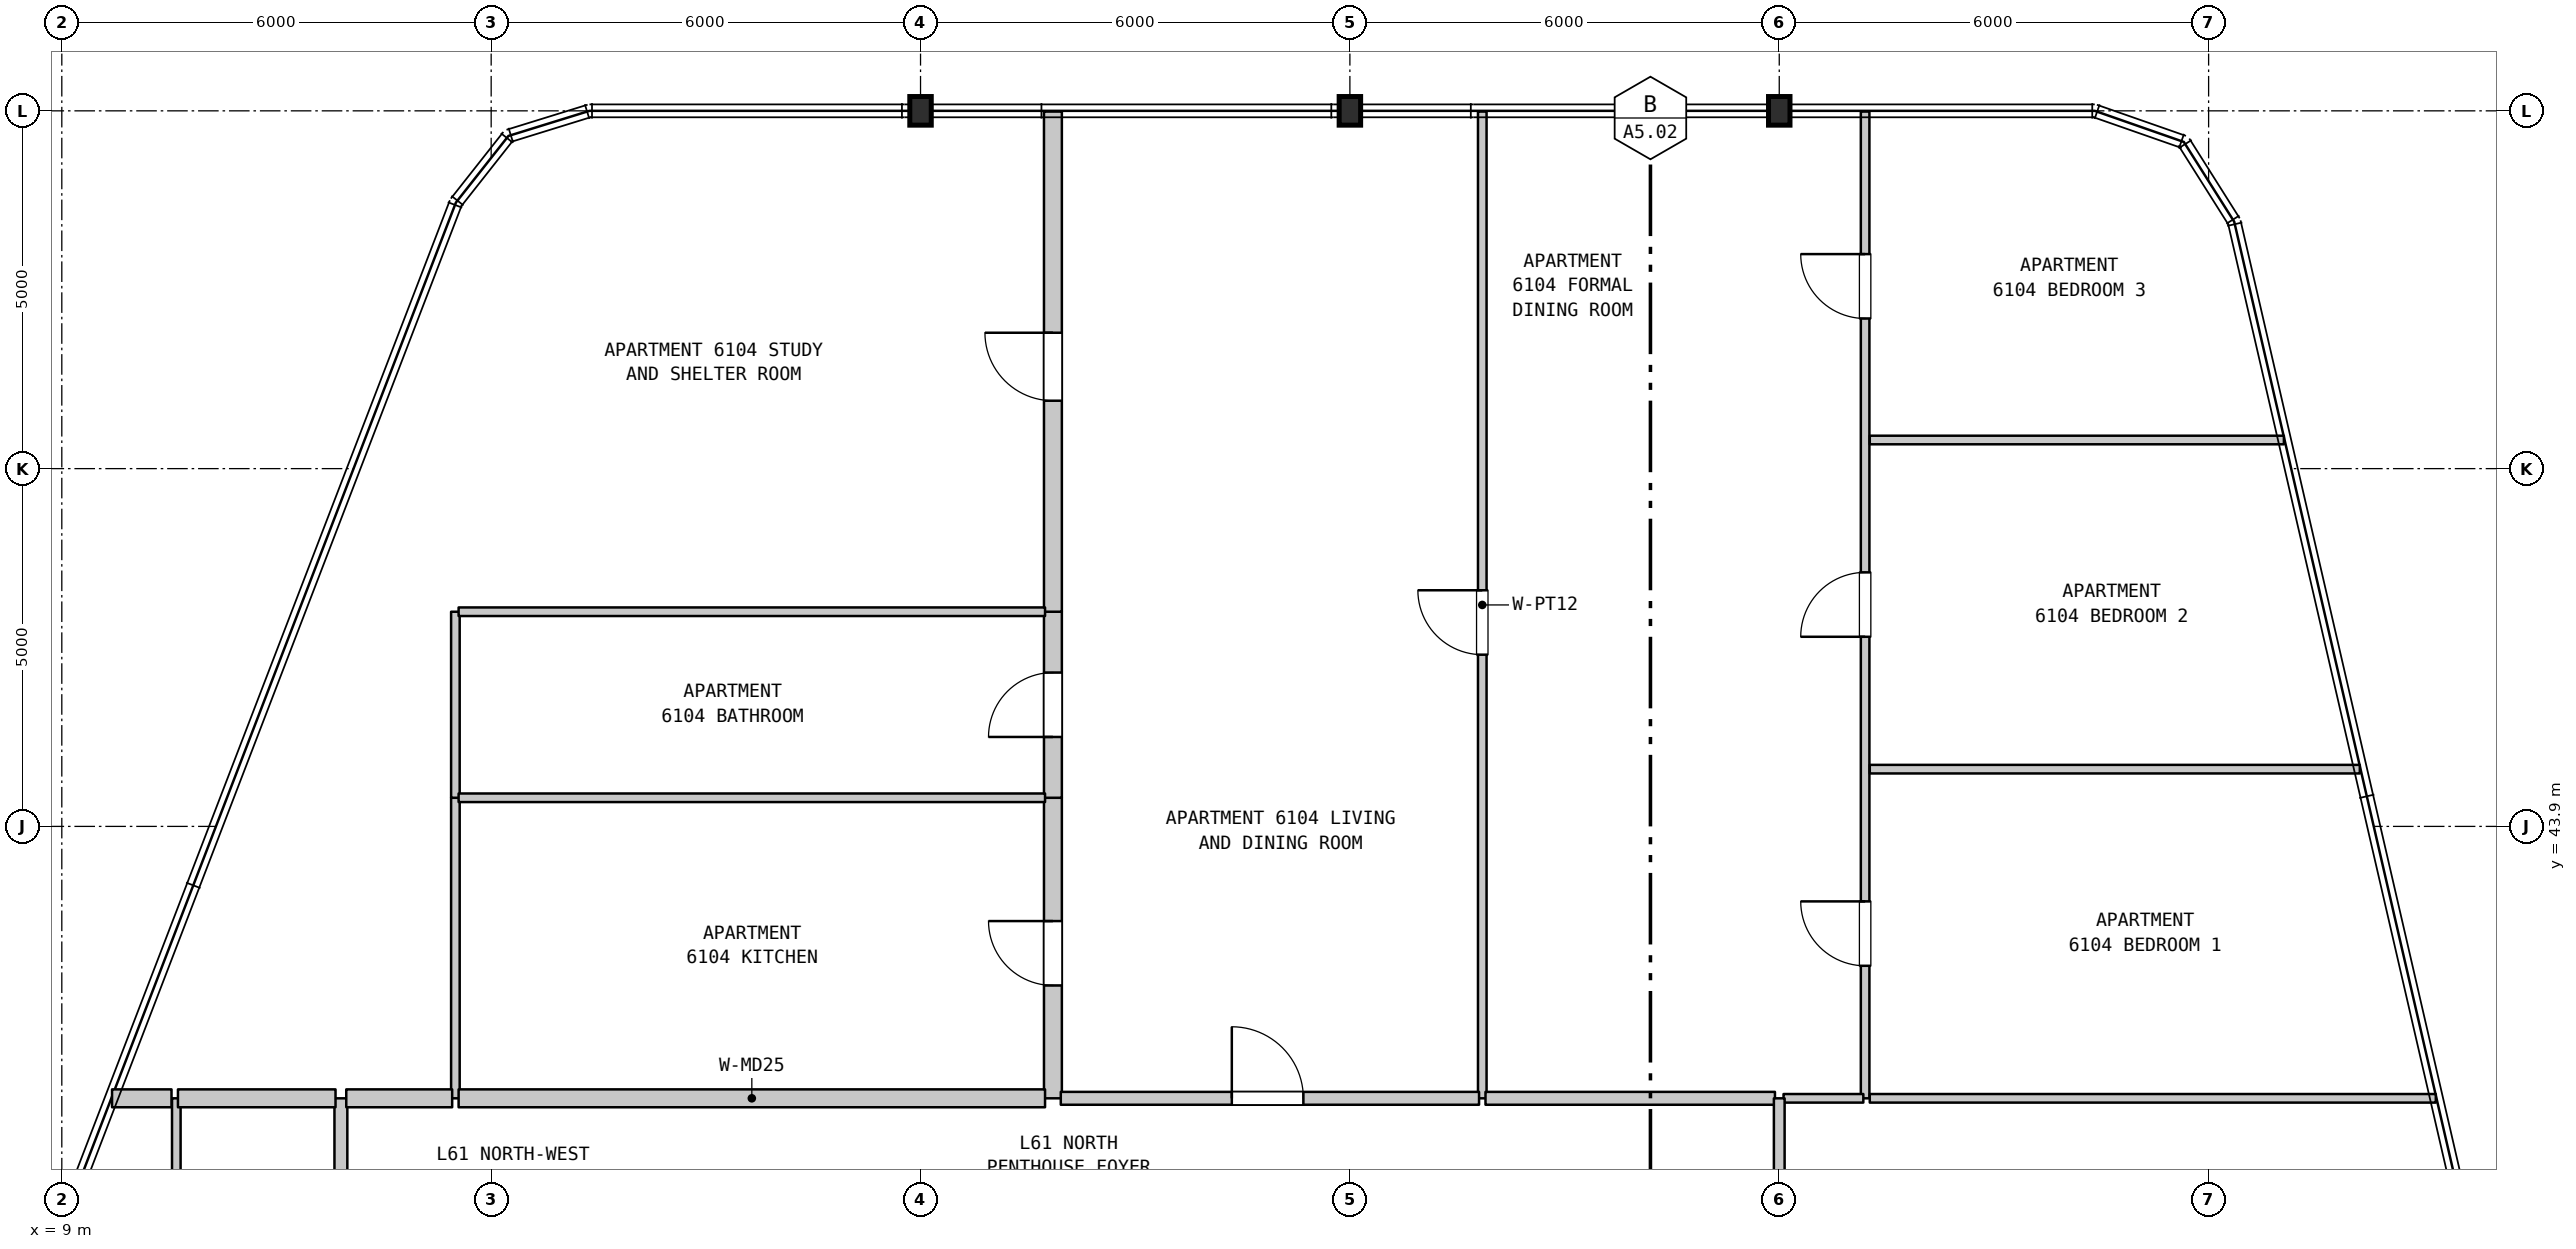
"""IFC4 building model, lengths in metres.
Left out: names, types, materials, properties, quantities, classifications, styles, units other than length and angle.
Written with IfcOpenShell. Run it as: python <this file> out.ifc"""

import sys

from ifc_helpers import new_model, si_unit, direction, frame, frame_2d, origin, origin_2d, place, context, subcontext, project, spatial, rectangle, i_section, extrude, element, fill, save


model = new_model("IFC4")
c1 = context("Model", 3, precision=1e-05, world=origin(), true_north=direction((0.0, 1.0)))
c2 = subcontext(c1, "Body", "Model", "MODEL_VIEW")
j1 = project(units=[si_unit("LENGTHUNIT", "METRE"), si_unit("PLANEANGLEUNIT", "RADIAN")], contexts=[c1])
p1 = place(None, origin())
s1 = spatial("IfcSite", under=j1, at=p1, CompositionType="ELEMENT")
p2 = place(p1, origin())
s2 = spatial("IfcBuilding", under=s1, at=p2, CompositionType="ELEMENT")
p3 = place(p2, frame((0.0, 0.0, 247.3)))
s3 = spatial("IfcBuildingStorey", under=s2, at=p3, CompositionType="ELEMENT", Elevation=247.3)
for number, where, z_axis, x_axis in (
    (1, (21.0, 53.9, 0.0), (0.0, 0.0, 1.0), (1.0, 0.0, 0.0)),
    (2, (27.0, 53.9, 0.0), (0.0, 0.0, 1.0), (1.0, 0.0, 0.0)),
    (3, (33.0, 53.9, 0.0), (0.0, 0.0, 1.0), (1.0, 0.0, 0.0)),
):
    element("IfcColumn", number, at=place(p3, frame(where, z_axis=z_axis, x_axis=x_axis)), inside=s3, PredefinedType="COLUMN", context=c2, shape_type="SweptSolid", body=[
        extrude(i_section(OverallWidth=0.3, OverallDepth=0.4, WebThickness=0.013, FlangeThickness=0.024, FilletRadius=0.027, at=origin_2d()), origin(), (0.0, 0.0, 1.0), 3.7),
    ])
p4 = place(p3, frame((10.6, 31.5, 0.0), z_axis=(0.0, 0.0, 1.0), x_axis=(0.0, 1.0, 0.0)))
e4 = element("IfcWall", 4, at=p4, inside=s3, PredefinedType="PARTITIONING", context=c2, shape_type="SweptSolid", body=[
    extrude(rectangle(XDim=8.6, YDim=0.12, at=frame_2d((4.3, 0.0))), origin(), (0.0, 0.0, 1.0), 3.39),
])
p5 = place(p3, frame((12.9, 31.5, 0.0), z_axis=(0.0, 0.0, 1.0), x_axis=(0.0, 1.0, 0.0)))
e5 = element("IfcWall", 5, at=p5, inside=s3, PredefinedType="STANDARD", context=c2, shape_type="SweptSolid", body=[
    extrude(rectangle(XDim=8.6, YDim=0.18, at=frame_2d((4.3, 0.0))), origin(), (0.0, 0.0, 1.0), 3.39),
])
p6 = place(p3, frame((14.5, 40.1, 0.0), z_axis=(0.0, 0.0, 1.0), x_axis=(0.0, 1.0, 0.0)))
e6 = element("IfcWall", 6, at=p6, inside=s3, PredefinedType="PARTITIONING", context=c2, shape_type="SweptSolid", body=[
    extrude(rectangle(XDim=4.2, YDim=0.12, at=frame_2d((2.1, 0.0))), origin(), (0.0, 0.0, 1.0), 3.39),
])
p7 = place(p3, frame((14.5, 44.3, 0.0), z_axis=(0.0, 0.0, 1.0), x_axis=(0.0, 1.0, 0.0)))
e7 = element("IfcWall", 7, at=p7, inside=s3, PredefinedType="PARTITIONING", context=c2, shape_type="SweptSolid", body=[
    extrude(rectangle(XDim=2.6, YDim=0.12, at=frame_2d((1.3, 0.0))), origin(), (0.0, 0.0, 1.0), 3.39),
])
p8 = place(p3, frame((22.85, 40.1, 0.0), z_axis=(0.0, 0.0, 1.0), x_axis=(0.0, 1.0, 0.0)))
e8 = element("IfcWall", 8, at=p8, inside=s3, PredefinedType="STANDARD", context=c2, shape_type="SweptSolid", body=[
    extrude(rectangle(XDim=4.2, YDim=0.25, at=frame_2d((2.1, 0.0))), origin(), (0.0, 0.0, 1.0), 3.39),
])
p9 = place(p8, frame((1.577, 0.0, 0.0)))
e9 = element("IfcOpeningElement", 9, at=p9, cuts=e8, PredefinedType="OPENING", context=c2, shape_type="SweptSolid", body=[
    extrude(rectangle(XDim=0.9, YDim=2.15, at=frame_2d((0.45, 1.075))), frame((0.0, 0.135, 0.0), z_axis=(0.0, -1.0, 0.0), x_axis=(1.0, 0.0, 0.0)), (0.0, 0.0, 1.0), 0.27),
])
p10 = place(p3, frame((22.85, 44.3, 0.0), z_axis=(0.0, 0.0, 1.0), x_axis=(0.0, 1.0, 0.0)))
e10 = element("IfcWall", 10, at=p10, inside=s3, PredefinedType="STANDARD", context=c2, shape_type="SweptSolid", body=[
    extrude(rectangle(XDim=2.6, YDim=0.25, at=frame_2d((1.3, 0.0))), origin(), (0.0, 0.0, 1.0), 3.39),
])
p11 = place(p10, frame((0.85, 0.0, 0.0)))
e11 = element("IfcOpeningElement", 11, at=p11, cuts=e10, PredefinedType="OPENING", context=c2, shape_type="SweptSolid", body=[
    extrude(rectangle(XDim=0.9, YDim=2.1, at=frame_2d((0.45, 1.05))), frame((0.0, 0.135, 0.0), z_axis=(0.0, -1.0, 0.0), x_axis=(1.0, 0.0, 0.0)), (0.0, 0.0, 1.0), 0.27),
])
p12 = place(p3, frame((22.85, 46.9, 0.0), z_axis=(0.0, 0.0, 1.0), x_axis=(0.0, 1.0, 0.0)))
e12 = element("IfcWall", 12, at=p12, inside=s3, PredefinedType="STANDARD", context=c2, shape_type="SweptSolid", body=[
    extrude(rectangle(XDim=6.99, YDim=0.25, at=frame_2d((3.495, 0.0))), origin(), (0.0, 0.0, 1.0), 3.39),
])
p13 = place(p12, frame((2.949, 0.0, 0.0)))
e13 = element("IfcOpeningElement", 13, at=p13, cuts=e12, PredefinedType="OPENING", context=c2, shape_type="SweptSolid", body=[
    extrude(rectangle(XDim=0.95, YDim=2.15, at=frame_2d((0.475, 1.075))), frame((0.0, 0.135, 0.0), z_axis=(0.0, -1.0, 0.0), x_axis=(1.0, 0.0, 0.0)), (0.0, 0.0, 1.0), 0.27),
])
p14 = place(p3, frame((28.85, 40.1, 0.0), z_axis=(0.0, 0.0, 1.0), x_axis=(0.0, 1.0, 0.0)))
e14 = element("IfcWall", 14, at=p14, inside=s3, PredefinedType="PARTITIONING", context=c2, shape_type="SweptSolid", body=[
    extrude(rectangle(XDim=13.79, YDim=0.12, at=frame_2d((6.895, 0.0))), origin(), (0.0, 0.0, 1.0), 3.39),
])
p15 = place(p14, frame((6.2, 0.0, 0.0)))
e15 = element("IfcOpeningElement", 15, at=p15, cuts=e14, PredefinedType="OPENING", context=c2, shape_type="SweptSolid", body=[
    extrude(rectangle(XDim=0.9, YDim=2.15, at=frame_2d((0.45, 1.075))), frame((0.0, 0.07, 0.0), z_axis=(0.0, -1.0, 0.0), x_axis=(1.0, 0.0, 0.0)), (0.0, 0.0, 1.0), 0.14),
])
p16 = place(p3, frame((34.2, 40.1, 0.0), z_axis=(0.0, 0.0, 1.0), x_axis=(0.0, 1.0, 0.0)))
e16 = element("IfcWall", 16, at=p16, inside=s3, PredefinedType="PARTITIONING", context=c2, shape_type="SweptSolid", body=[
    extrude(rectangle(XDim=13.79, YDim=0.12, at=frame_2d((6.895, 0.0))), origin(), (0.0, 0.0, 1.0), 3.39),
])
p17 = place(p16, frame((1.852, 0.0, 0.0)))
e17 = element("IfcOpeningElement", 17, at=p17, cuts=e16, PredefinedType="OPENING", context=c2, shape_type="SweptSolid", body=[
    extrude(rectangle(XDim=0.9, YDim=2.15, at=frame_2d((0.45, 1.075))), frame((0.0, 0.07, 0.0), z_axis=(0.0, -1.0, 0.0), x_axis=(1.0, 0.0, 0.0)), (0.0, 0.0, 1.0), 0.14),
])
p18 = place(p16, frame((6.45, 0.0, 0.0)))
e18 = element("IfcOpeningElement", 18, at=p18, cuts=e16, PredefinedType="OPENING", context=c2, shape_type="SweptSolid", body=[
    extrude(rectangle(XDim=0.9, YDim=2.15, at=frame_2d((0.45, 1.075))), frame((0.0, 0.07, 0.0), z_axis=(0.0, -1.0, 0.0), x_axis=(1.0, 0.0, 0.0)), (0.0, 0.0, 1.0), 0.14),
])
p19 = place(p16, frame((10.898, 0.0, 0.0)))
e19 = element("IfcOpeningElement", 19, at=p19, cuts=e16, PredefinedType="OPENING", context=c2, shape_type="SweptSolid", body=[
    extrude(rectangle(XDim=0.9, YDim=2.15, at=frame_2d((0.45, 1.075))), frame((0.0, 0.07, 0.0), z_axis=(0.0, -1.0, 0.0), x_axis=(1.0, 0.0, 0.0)), (0.0, 0.0, 1.0), 0.14),
])
p20 = place(p3, frame((9.702, 40.1, 0.0), z_axis=(0.0, 0.0, 1.0), x_axis=(1.0, 0.0, 0.0)))
e20 = element("IfcWall", 20, at=p20, inside=s3, PredefinedType="STANDARD", context=c2, shape_type="SweptSolid", body=[
    extrude(rectangle(XDim=0.831, YDim=0.25, at=frame_2d((0.416, 0.0))), origin(), (0.0, 0.0, 1.0), 3.39),
])
p21 = place(p3, frame((10.623, 40.1, 0.0), z_axis=(0.0, 0.0, 1.0), x_axis=(1.0, 0.0, 0.0)))
e21 = element("IfcWall", 21, at=p21, inside=s3, PredefinedType="STANDARD", context=c2, shape_type="SweptSolid", body=[
    extrude(rectangle(XDim=2.202, YDim=0.25, at=frame_2d((1.101, 0.0))), origin(), (0.0, 0.0, 1.0), 3.39),
])
p22 = place(p3, frame((12.975, 40.1, 0.0), z_axis=(0.0, 0.0, 1.0), x_axis=(1.0, 0.0, 0.0)))
e22 = element("IfcWall", 22, at=p22, inside=s3, PredefinedType="STANDARD", context=c2, shape_type="SweptSolid", body=[
    extrude(rectangle(XDim=1.48, YDim=0.25, at=frame_2d((0.74, 0.0))), origin(), (0.0, 0.0, 1.0), 3.39),
])
p23 = place(p3, frame((14.545, 40.1, 0.0), z_axis=(0.0, 0.0, 1.0), x_axis=(1.0, 0.0, 0.0)))
e23 = element("IfcWall", 23, at=p23, inside=s3, PredefinedType="STANDARD", context=c2, shape_type="SweptSolid", body=[
    extrude(rectangle(XDim=8.195, YDim=0.25, at=frame_2d((4.098, 0.0))), origin(), (0.0, 0.0, 1.0), 3.39),
])
p24 = place(p3, frame((22.96, 40.1, 0.0), z_axis=(0.0, 0.0, 1.0), x_axis=(1.0, 0.0, 0.0)))
e24 = element("IfcWall", 24, at=p24, inside=s3, PredefinedType="STANDARD", context=c2, shape_type="SweptSolid", body=[
    extrude(rectangle(XDim=5.845, YDim=0.18, at=frame_2d((2.922, 0.0))), origin(), (0.0, 0.0, 1.0), 3.39),
])
p25 = place(p24, frame((2.39, 0.0, 0.0)))
e25 = element("IfcOpeningElement", 25, at=p25, cuts=e24, PredefinedType="OPENING", context=c2, shape_type="SweptSolid", body=[
    extrude(rectangle(XDim=1.0, YDim=2.15, at=frame_2d((0.5, 1.075))), frame((0.0, 0.1, 0.0), z_axis=(0.0, -1.0, 0.0), x_axis=(1.0, 0.0, 0.0)), (0.0, 0.0, 1.0), 0.2),
])
p26 = place(p3, frame((28.895, 40.1, 0.0), z_axis=(0.0, 0.0, 1.0), x_axis=(1.0, 0.0, 0.0)))
e26 = element("IfcWall", 26, at=p26, inside=s3, PredefinedType="STANDARD", context=c2, shape_type="SweptSolid", body=[
    extrude(rectangle(XDim=4.045, YDim=0.18, at=frame_2d((2.022, 0.0))), origin(), (0.0, 0.0, 1.0), 3.39),
])
p27 = place(p3, frame((33.06, 40.1, 0.0), z_axis=(0.0, 0.0, 1.0), x_axis=(1.0, 0.0, 0.0)))
e27 = element("IfcWall", 27, at=p27, inside=s3, PredefinedType="PARTITIONING", context=c2, shape_type="SweptSolid", body=[
    extrude(rectangle(XDim=1.115, YDim=0.12, at=frame_2d((0.558, 0.0))), origin(), (0.0, 0.0, 1.0), 3.39),
])
p28 = place(p3, frame((34.265, 40.1, 0.0), z_axis=(0.0, 0.0, 1.0), x_axis=(1.0, 0.0, 0.0)))
e28 = element("IfcWall", 28, at=p28, inside=s3, PredefinedType="PARTITIONING", context=c2, shape_type="SweptSolid", body=[
    extrude(rectangle(XDim=7.91, YDim=0.12, at=frame_2d((3.955, 0.0))), origin(), (0.0, 0.0, 1.0), 3.39),
])
p29 = place(p3, frame((14.545, 44.3, 0.0), z_axis=(0.0, 0.0, 1.0), x_axis=(1.0, 0.0, 0.0)))
e29 = element("IfcWall", 29, at=p29, inside=s3, PredefinedType="PARTITIONING", context=c2, shape_type="SweptSolid", body=[
    extrude(rectangle(XDim=8.195, YDim=0.12, at=frame_2d((4.098, 0.0))), origin(), (0.0, 0.0, 1.0), 3.39),
])
p30 = place(p3, frame((34.265, 44.7, 0.0), z_axis=(0.0, 0.0, 1.0), x_axis=(1.0, 0.0, 0.0)))
e30 = element("IfcWall", 30, at=p30, inside=s3, PredefinedType="PARTITIONING", context=c2, shape_type="SweptSolid", body=[
    extrude(rectangle(XDim=6.848, YDim=0.12, at=frame_2d((3.424, 0.0))), origin(), (0.0, 0.0, 1.0), 3.39),
])
p31 = place(p3, frame((14.545, 46.9, 0.0), z_axis=(0.0, 0.0, 1.0), x_axis=(1.0, 0.0, 0.0)))
e31 = element("IfcWall", 31, at=p31, inside=s3, PredefinedType="PARTITIONING", context=c2, shape_type="SweptSolid", body=[
    extrude(rectangle(XDim=8.195, YDim=0.12, at=frame_2d((4.098, 0.0))), origin(), (0.0, 0.0, 1.0), 3.39),
])
p32 = place(p3, frame((34.265, 49.3, 0.0), z_axis=(0.0, 0.0, 1.0), x_axis=(1.0, 0.0, 0.0)))
e32 = element("IfcWall", 32, at=p32, inside=s3, PredefinedType="PARTITIONING", context=c2, shape_type="SweptSolid", body=[
    extrude(rectangle(XDim=5.787, YDim=0.12, at=frame_2d((2.894, 0.0))), origin(), (0.0, 0.0, 1.0), 3.39),
])
p33 = place(p3, frame((33.0, 37.9, 0.0), z_axis=(0.0, 0.0, 1.0), x_axis=(0.0, 1.0, 0.0)))
e33 = element("IfcWall", 33, at=p33, inside=s3, PredefinedType="STANDARD", context=c2, shape_type="SweptSolid", body=[
    extrude(rectangle(XDim=2.2, YDim=0.15, at=frame_2d((1.1, 0.0))), origin(), (0.0, 0.0, 1.0), 2.79),
])
p34 = place(p9, origin())
e34 = element("IfcDoor", 34, at=p34, inside=s3, OperationType="SINGLE_SWING_RIGHT", PredefinedType="DOOR", context=c2, shape_type="SweptSolid", body=[
    extrude(rectangle(XDim=0.9, YDim=2.15, at=frame_2d((0.45, 1.075))), frame((0.0, 0.025, 0.0), z_axis=(0.0, -1.0, 0.0), x_axis=(1.0, 0.0, 0.0)), (0.0, 0.0, 1.0), 0.05),
])
fill(e9, e34)
p35 = place(p11, origin())
e35 = element("IfcDoor", 35, at=p35, inside=s3, OperationType="SINGLE_SWING_LEFT", PredefinedType="DOOR", context=c2, shape_type="SweptSolid", body=[
    extrude(rectangle(XDim=0.9, YDim=2.1, at=frame_2d((0.45, 1.05))), frame((0.0, 0.025, 0.0), z_axis=(0.0, -1.0, 0.0), x_axis=(1.0, 0.0, 0.0)), (0.0, 0.0, 1.0), 0.05),
])
fill(e11, e35)
p36 = place(p13, origin())
e36 = element("IfcDoor", 36, at=p36, inside=s3, OperationType="SINGLE_SWING_RIGHT", PredefinedType="DOOR", context=c2, shape_type="SweptSolid", body=[
    extrude(rectangle(XDim=0.95, YDim=2.15, at=frame_2d((0.475, 1.075))), frame((0.0, 0.025, 0.0), z_axis=(0.0, -1.0, 0.0), x_axis=(1.0, 0.0, 0.0)), (0.0, 0.0, 1.0), 0.05),
])
fill(e13, e36)
p37 = place(p15, origin())
e37 = element("IfcDoor", 37, at=p37, inside=s3, OperationType="SINGLE_SWING_RIGHT", PredefinedType="DOOR", context=c2, shape_type="SweptSolid", body=[
    extrude(rectangle(XDim=0.9, YDim=2.15, at=frame_2d((0.45, 1.075))), frame((0.0, 0.025, 0.0), z_axis=(0.0, -1.0, 0.0), x_axis=(1.0, 0.0, 0.0)), (0.0, 0.0, 1.0), 0.05),
])
fill(e15, e37)
p38 = place(p17, origin())
e38 = element("IfcDoor", 38, at=p38, inside=s3, OperationType="SINGLE_SWING_RIGHT", PredefinedType="DOOR", context=c2, shape_type="SweptSolid", body=[
    extrude(rectangle(XDim=0.9, YDim=2.15, at=frame_2d((0.45, 1.075))), frame((0.0, 0.025, 0.0), z_axis=(0.0, -1.0, 0.0), x_axis=(1.0, 0.0, 0.0)), (0.0, 0.0, 1.0), 0.05),
])
fill(e17, e38)
p39 = place(p18, origin())
e39 = element("IfcDoor", 39, at=p39, inside=s3, OperationType="SINGLE_SWING_LEFT", PredefinedType="DOOR", context=c2, shape_type="SweptSolid", body=[
    extrude(rectangle(XDim=0.9, YDim=2.15, at=frame_2d((0.45, 1.075))), frame((0.0, 0.025, 0.0), z_axis=(0.0, -1.0, 0.0), x_axis=(1.0, 0.0, 0.0)), (0.0, 0.0, 1.0), 0.05),
])
fill(e18, e39)
p40 = place(p19, origin())
e40 = element("IfcDoor", 40, at=p40, inside=s3, OperationType="SINGLE_SWING_RIGHT", PredefinedType="DOOR", context=c2, shape_type="SweptSolid", body=[
    extrude(rectangle(XDim=0.9, YDim=2.15, at=frame_2d((0.45, 1.075))), frame((0.0, 0.025, 0.0), z_axis=(0.0, -1.0, 0.0), x_axis=(1.0, 0.0, 0.0)), (0.0, 0.0, 1.0), 0.05),
])
fill(e19, e40)
p41 = place(p25, origin())
e41 = element("IfcDoor", 41, at=p41, inside=s3, OperationType="SINGLE_SWING_LEFT", PredefinedType="DOOR", context=c2, shape_type="SweptSolid", body=[
    extrude(rectangle(XDim=1.0, YDim=2.15, at=frame_2d((0.5, 1.075))), frame((0.0, 0.025, 0.0), z_axis=(0.0, -1.0, 0.0), x_axis=(1.0, 0.0, 0.0)), (0.0, 0.0, 1.0), 0.05),
])
fill(e25, e41)
save(model, sys.argv[1])
